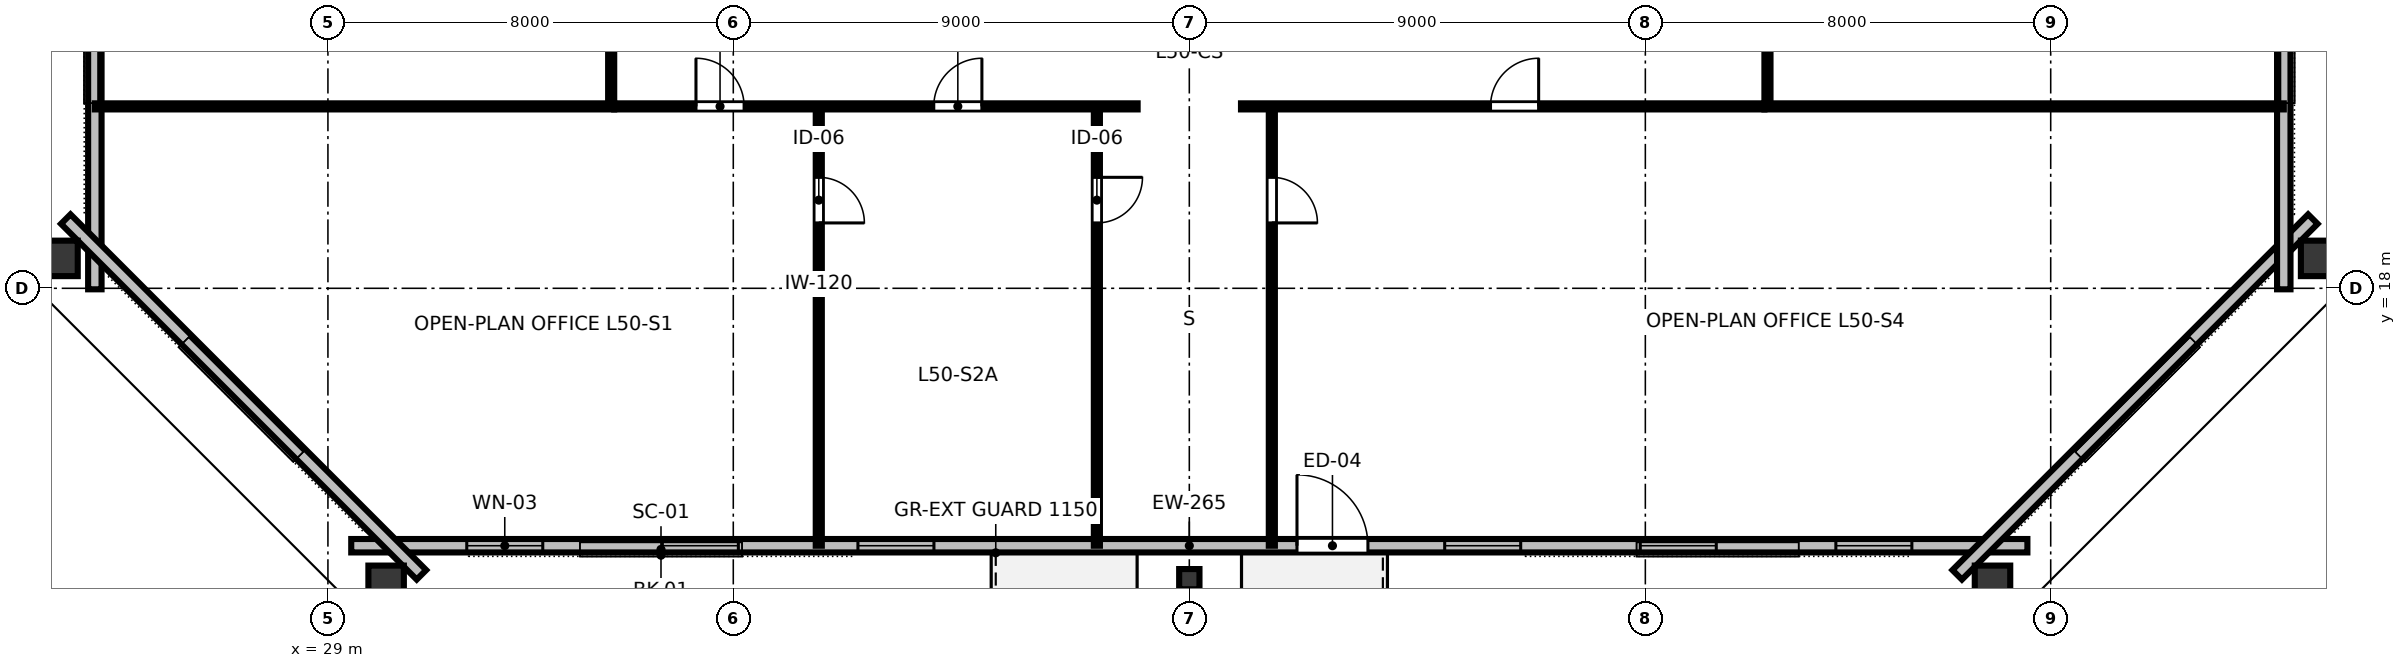
"""IFC4 building model, lengths in metres.
Left out: names, types, materials, properties, quantities, classifications, styles, units other than length and angle.
Written with IfcOpenShell. Run it as: python <this file> out.ifc"""

import sys

from ifc_helpers import new_model, si_unit, direction, frame, frame_2d, origin, origin_2d, place, context, subcontext, project, spatial, rectangle, hollow_rectangle, i_section, extrude, element, fill, save


model = new_model("IFC4")
c1 = context("Model", 3, precision=1e-05, world=origin(), true_north=direction((0.0, 1.0)))
c2 = subcontext(c1, "Body", "Model", "MODEL_VIEW")
j1 = project(units=[si_unit("LENGTHUNIT", "METRE"), si_unit("PLANEANGLEUNIT", "RADIAN")], contexts=[c1])
p1 = place(None, origin())
s1 = spatial("IfcSite", under=j1, at=p1, CompositionType="ELEMENT")
p2 = place(p1, origin())
s2 = spatial("IfcBuilding", under=s1, at=p2, CompositionType="ELEMENT")
p3 = place(p2, frame((0.0, 0.0, 191.4)))
s3 = spatial("IfcBuildingStorey", under=s2, at=p3, CompositionType="ELEMENT", Elevation=191.4)
p4 = place(p3, frame((30.149, 12.103, 0.0), z_axis=(0.0, 0.0, 1.0), x_axis=(1.0, 0.0, 0.0)))
e1 = element("IfcColumn", 1, at=p4, inside=s3, PredefinedType="COLUMN", context=c2, shape_type="SweptSolid", body=[
    extrude(hollow_rectangle(XDim=0.7, YDim=0.85, WallThickness=0.04, at=origin_2d()), origin(), (0.0, 0.0, 1.0), 3.373),
])
p5 = place(p3, frame((46.0, 12.26, 0.0), z_axis=(0.0, 0.0, 1.0), x_axis=(1.0, 0.0, 0.0)))
e2 = element("IfcColumn", 2, at=p5, inside=s3, PredefinedType="COLUMN", context=c2, shape_type="SweptSolid", body=[
    extrude(i_section(OverallWidth=0.401, OverallDepth=0.399, WebThickness=0.025, FlangeThickness=0.04, FilletRadius=0.025, at=origin_2d()), origin(), (0.0, 0.0, 1.0), 3.373),
])
for number, where, z_axis, x_axis in (
    (3, (61.851, 12.103, 0.0), (0.0, 0.0, 1.0), (1.0, 0.0, 0.0)),
    (4, (68.363, 18.59, 0.0), (0.0, 0.0, 1.0), (0.0, 1.0, 0.0)),
    (5, (23.637, 18.59, 0.0), (0.0, 0.0, 1.0), (0.0, 1.0, 0.0)),
):
    element("IfcColumn", number, at=place(p3, frame(where, z_axis=z_axis, x_axis=x_axis)), inside=s3, PredefinedType="COLUMN", context=c2, shape_type="SweptSolid", body=[
        extrude(hollow_rectangle(XDim=0.7, YDim=0.85, WallThickness=0.04, at=origin_2d()), origin(), (0.0, 0.0, 1.0), 3.373),
    ])
p6 = place(p3, frame((29.46, 12.92, 0.0), z_axis=(0.0, 0.0, 1.0), x_axis=(1.0, 0.0, 0.0)))
e6 = element("IfcWall", 6, at=p6, inside=s3, PredefinedType="STANDARD", context=c2, shape_type="SweptSolid", body=[
    extrude(rectangle(XDim=33.08, YDim=0.265, at=frame_2d((16.54, 0.0))), origin(), (0.0, 0.0, 1.0), 3.375),
])
p7 = place(p6, frame((18.665, 0.0, 0.0)))
e7 = element("IfcOpeningElement", 7, at=p7, cuts=e6, PredefinedType="OPENING", context=c2, shape_type="SweptSolid", body=[
    extrude(rectangle(XDim=1.4, YDim=2.15, at=frame_2d((0.7, 1.075))), frame((0.0, 0.142, 0.0), z_axis=(0.0, -1.0, 0.0), x_axis=(1.0, 0.0, 0.0)), (0.0, 0.0, 1.0), 0.285),
])
p8 = place(p6, frame((2.28, 0.0, 0.85)))
e8 = element("IfcOpeningElement", 8, at=p8, cuts=e6, PredefinedType="OPENING", context=c2, shape_type="SweptSolid", body=[
    extrude(rectangle(XDim=1.5, YDim=1.85, at=frame_2d((0.75, 0.925))), frame((0.0, 0.142, 0.0), z_axis=(0.0, -1.0, 0.0), x_axis=(1.0, 0.0, 0.0)), (0.0, 0.0, 1.0), 0.285),
])
p9 = place(p6, frame((6.14, 0.0, 0.85)))
e9 = element("IfcOpeningElement", 9, at=p9, cuts=e6, PredefinedType="OPENING", context=c2, shape_type="SweptSolid", body=[
    extrude(rectangle(XDim=1.5, YDim=1.85, at=frame_2d((0.75, 0.925))), frame((0.0, 0.142, 0.0), z_axis=(0.0, -1.0, 0.0), x_axis=(1.0, 0.0, 0.0)), (0.0, 0.0, 1.0), 0.285),
])
p10 = place(p6, frame((10.0, 0.0, 0.85)))
e10 = element("IfcOpeningElement", 10, at=p10, cuts=e6, PredefinedType="OPENING", context=c2, shape_type="SweptSolid", body=[
    extrude(rectangle(XDim=1.5, YDim=1.85, at=frame_2d((0.75, 0.925))), frame((0.0, 0.142, 0.0), z_axis=(0.0, -1.0, 0.0), x_axis=(1.0, 0.0, 0.0)), (0.0, 0.0, 1.0), 0.285),
])
p11 = place(p6, frame((21.58, 0.0, 0.85)))
e11 = element("IfcOpeningElement", 11, at=p11, cuts=e6, PredefinedType="OPENING", context=c2, shape_type="SweptSolid", body=[
    extrude(rectangle(XDim=1.5, YDim=1.85, at=frame_2d((0.75, 0.925))), frame((0.0, 0.142, 0.0), z_axis=(0.0, -1.0, 0.0), x_axis=(1.0, 0.0, 0.0)), (0.0, 0.0, 1.0), 0.285),
])
p12 = place(p6, frame((25.44, 0.0, 0.85)))
e12 = element("IfcOpeningElement", 12, at=p12, cuts=e6, PredefinedType="OPENING", context=c2, shape_type="SweptSolid", body=[
    extrude(rectangle(XDim=1.5, YDim=1.85, at=frame_2d((0.75, 0.925))), frame((0.0, 0.142, 0.0), z_axis=(0.0, -1.0, 0.0), x_axis=(1.0, 0.0, 0.0)), (0.0, 0.0, 1.0), 0.285),
])
p13 = place(p6, frame((29.3, 0.0, 0.85)))
e13 = element("IfcOpeningElement", 13, at=p13, cuts=e6, PredefinedType="OPENING", context=c2, shape_type="SweptSolid", body=[
    extrude(rectangle(XDim=1.5, YDim=1.85, at=frame_2d((0.75, 0.925))), frame((0.0, 0.142, 0.0), z_axis=(0.0, -1.0, 0.0), x_axis=(1.0, 0.0, 0.0)), (0.0, 0.0, 1.0), 0.285),
])
p14 = place(p3, frame((61.155, 12.346, 0.0), z_axis=(0.0, 0.0, 1.0), x_axis=(0.707106781187, 0.707106781187, 0.0)))
e14 = element("IfcWall", 14, at=p14, inside=s3, PredefinedType="STANDARD", context=c2, shape_type="SweptSolid", body=[
    extrude(rectangle(XDim=9.927, YDim=0.265, at=frame_2d((4.963, 0.0))), origin(), (0.0, 0.0, 1.0), 3.375),
])
p15 = place(p3, frame((67.6, 17.98, 0.0), z_axis=(0.0, 0.0, 1.0), x_axis=(0.0, 1.0, 0.0)))
e15 = element("IfcWall", 15, at=p15, inside=s3, PredefinedType="STANDARD", context=c2, shape_type="SweptSolid", body=[
    extrude(rectangle(XDim=28.04, YDim=0.265, at=frame_2d((14.02, 0.0))), origin(), (0.0, 0.0, 1.0), 3.375),
])
p16 = place(p15, frame((5.887, 0.0, 0.85)))
e16 = element("IfcOpeningElement", 16, at=p16, cuts=e15, PredefinedType="OPENING", context=c2, shape_type="SweptSolid", body=[
    extrude(rectangle(XDim=1.5, YDim=1.85, at=frame_2d((0.75, 0.925))), frame((0.0, 0.142, 0.0), z_axis=(0.0, -1.0, 0.0), x_axis=(1.0, 0.0, 0.0)), (0.0, 0.0, 1.0), 0.285),
])
p17 = place(p15, frame((9.579, 0.0, 0.85)))
e17 = element("IfcOpeningElement", 17, at=p17, cuts=e15, PredefinedType="OPENING", context=c2, shape_type="SweptSolid", body=[
    extrude(rectangle(XDim=1.5, YDim=1.85, at=frame_2d((0.75, 0.925))), frame((0.0, 0.142, 0.0), z_axis=(0.0, -1.0, 0.0), x_axis=(1.0, 0.0, 0.0)), (0.0, 0.0, 1.0), 0.285),
])
p18 = place(p15, frame((16.961, 0.0, 0.85)))
e18 = element("IfcOpeningElement", 18, at=p18, cuts=e15, PredefinedType="OPENING", context=c2, shape_type="SweptSolid", body=[
    extrude(rectangle(XDim=1.5, YDim=1.85, at=frame_2d((0.75, 0.925))), frame((0.0, 0.142, 0.0), z_axis=(0.0, -1.0, 0.0), x_axis=(1.0, 0.0, 0.0)), (0.0, 0.0, 1.0), 0.285),
])
p19 = place(p15, frame((20.653, 0.0, 0.85)))
e19 = element("IfcOpeningElement", 19, at=p19, cuts=e15, PredefinedType="OPENING", context=c2, shape_type="SweptSolid", body=[
    extrude(rectangle(XDim=1.5, YDim=1.85, at=frame_2d((0.75, 0.925))), frame((0.0, 0.142, 0.0), z_axis=(0.0, -1.0, 0.0), x_axis=(1.0, 0.0, 0.0)), (0.0, 0.0, 1.0), 0.285),
])
p20 = place(p3, frame((24.4, 46.02, 0.0), z_axis=(0.0, 0.0, 1.0), x_axis=(0.0, -1.0, 0.0)))
e20 = element("IfcWall", 20, at=p20, inside=s3, PredefinedType="STANDARD", context=c2, shape_type="SweptSolid", body=[
    extrude(rectangle(XDim=28.04, YDim=0.265, at=frame_2d((14.02, 0.0))), origin(), (0.0, 0.0, 1.0), 3.375),
])
p21 = place(p20, frame((5.887, 0.0, 0.85)))
e21 = element("IfcOpeningElement", 21, at=p21, cuts=e20, PredefinedType="OPENING", context=c2, shape_type="SweptSolid", body=[
    extrude(rectangle(XDim=1.5, YDim=1.85, at=frame_2d((0.75, 0.925))), frame((0.0, 0.142, 0.0), z_axis=(0.0, -1.0, 0.0), x_axis=(1.0, 0.0, 0.0)), (0.0, 0.0, 1.0), 0.285),
])
p22 = place(p20, frame((16.961, 0.0, 0.85)))
e22 = element("IfcOpeningElement", 22, at=p22, cuts=e20, PredefinedType="OPENING", context=c2, shape_type="SweptSolid", body=[
    extrude(rectangle(XDim=1.5, YDim=1.85, at=frame_2d((0.75, 0.925))), frame((0.0, 0.142, 0.0), z_axis=(0.0, -1.0, 0.0), x_axis=(1.0, 0.0, 0.0)), (0.0, 0.0, 1.0), 0.285),
])
p23 = place(p20, frame((20.653, 0.0, 0.85)))
e23 = element("IfcOpeningElement", 23, at=p23, cuts=e20, PredefinedType="OPENING", context=c2, shape_type="SweptSolid", body=[
    extrude(rectangle(XDim=1.5, YDim=1.85, at=frame_2d((0.75, 0.925))), frame((0.0, 0.142, 0.0), z_axis=(0.0, -1.0, 0.0), x_axis=(1.0, 0.0, 0.0)), (0.0, 0.0, 1.0), 0.285),
])
p24 = place(p3, frame((23.826, 19.365, 0.0), z_axis=(0.0, 0.0, 1.0), x_axis=(0.707106781187, -0.707106781187, 0.0)))
e24 = element("IfcWall", 24, at=p24, inside=s3, PredefinedType="STANDARD", context=c2, shape_type="SweptSolid", body=[
    extrude(rectangle(XDim=9.927, YDim=0.265, at=frame_2d((4.963, 0.0))), origin(), (0.0, 0.0, 1.0), 3.375),
])
p25 = place(p3, frame((38.687, 21.59, 0.0), z_axis=(0.0, 0.0, 1.0), x_axis=(0.0, -1.0, 0.0)))
e25 = element("IfcWall", 25, at=p25, inside=s3, PredefinedType="PARTITIONING", context=c2, shape_type="SweptSolid", body=[
    extrude(rectangle(XDim=8.67, YDim=0.12, at=frame_2d((4.335, 0.0))), origin(), (0.0, 0.0, 1.0), 2.655),
])
p26 = place(p25, frame((1.4, 0.0, 0.0)))
e26 = element("IfcOpeningElement", 26, at=p26, cuts=e25, PredefinedType="OPENING", context=c2, shape_type="SweptSolid", body=[
    extrude(rectangle(XDim=0.9, YDim=2.15, at=frame_2d((0.45, 1.075))), frame((0.0, 0.07, 0.0), z_axis=(0.0, -1.0, 0.0), x_axis=(1.0, 0.0, 0.0)), (0.0, 0.0, 1.0), 0.14),
])
p27 = place(p3, frame((44.176, 21.59, 0.0), z_axis=(0.0, 0.0, 1.0), x_axis=(0.0, -1.0, 0.0)))
e27 = element("IfcWall", 27, at=p27, inside=s3, PredefinedType="PARTITIONING", context=c2, shape_type="SweptSolid", body=[
    extrude(rectangle(XDim=8.67, YDim=0.12, at=frame_2d((4.335, 0.0))), origin(), (0.0, 0.0, 1.0), 2.655),
])
p28 = place(p27, frame((1.4, 0.0, 0.0)))
e28 = element("IfcOpeningElement", 28, at=p28, cuts=e27, PredefinedType="OPENING", context=c2, shape_type="SweptSolid", body=[
    extrude(rectangle(XDim=0.9, YDim=2.15, at=frame_2d((0.45, 1.075))), frame((0.0, 0.07, 0.0), z_axis=(0.0, -1.0, 0.0), x_axis=(1.0, 0.0, 0.0)), (0.0, 0.0, 1.0), 0.14),
])
p29 = place(p3, frame((47.629, 21.59, 0.0), z_axis=(0.0, 0.0, 1.0), x_axis=(0.0, -1.0, 0.0)))
e29 = element("IfcWall", 29, at=p29, inside=s3, PredefinedType="PARTITIONING", context=c2, shape_type="SweptSolid", body=[
    extrude(rectangle(XDim=8.67, YDim=0.12, at=frame_2d((4.335, 0.0))), origin(), (0.0, 0.0, 1.0), 2.655),
])
p30 = place(p29, frame((1.4, 0.0, 0.0)))
e30 = element("IfcOpeningElement", 30, at=p30, cuts=e29, PredefinedType="OPENING", context=c2, shape_type="SweptSolid", body=[
    extrude(rectangle(XDim=0.9, YDim=2.15, at=frame_2d((0.45, 1.075))), frame((0.0, 0.07, 0.0), z_axis=(0.0, -1.0, 0.0), x_axis=(1.0, 0.0, 0.0)), (0.0, 0.0, 1.0), 0.14),
])
p31 = place(p3, frame((34.65, 21.59, 0.0), z_axis=(0.0, 0.0, 1.0), x_axis=(1.0, 0.0, 0.0)))
e31 = element("IfcWall", 31, at=p31, inside=s3, PredefinedType="PARTITIONING", context=c2, shape_type="SweptSolid", body=[
    extrude(rectangle(XDim=10.33, YDim=0.12, at=frame_2d((5.165, 0.0))), origin(), (0.0, 0.0, 1.0), 2.655),
])
p32 = place(p31, frame((1.614, 0.0, 0.0)))
e32 = element("IfcOpeningElement", 32, at=p32, cuts=e31, PredefinedType="OPENING", context=c2, shape_type="SweptSolid", body=[
    extrude(rectangle(XDim=0.95, YDim=2.15, at=frame_2d((0.475, 1.075))), frame((0.0, 0.07, 0.0), z_axis=(0.0, -1.0, 0.0), x_axis=(1.0, 0.0, 0.0)), (0.0, 0.0, 1.0), 0.14),
])
p33 = place(p31, frame((6.306, 0.0, 0.0)))
e33 = element("IfcOpeningElement", 33, at=p33, cuts=e31, PredefinedType="OPENING", context=c2, shape_type="SweptSolid", body=[
    extrude(rectangle(XDim=0.95, YDim=2.15, at=frame_2d((0.475, 1.075))), frame((0.0, 0.07, 0.0), z_axis=(0.0, -1.0, 0.0), x_axis=(1.0, 0.0, 0.0)), (0.0, 0.0, 1.0), 0.14),
])
p34 = place(p3, frame((47.02, 21.59, 0.0), z_axis=(0.0, 0.0, 1.0), x_axis=(1.0, 0.0, 0.0)))
e34 = element("IfcWall", 34, at=p34, inside=s3, PredefinedType="PARTITIONING", context=c2, shape_type="SweptSolid", body=[
    extrude(rectangle(XDim=10.33, YDim=0.12, at=frame_2d((5.165, 0.0))), origin(), (0.0, 0.0, 1.0), 2.655),
])
p35 = place(p34, frame((4.924, 0.0, 0.0)))
e35 = element("IfcOpeningElement", 35, at=p35, cuts=e34, PredefinedType="OPENING", context=c2, shape_type="SweptSolid", body=[
    extrude(rectangle(XDim=0.95, YDim=2.15, at=frame_2d((0.475, 1.075))), frame((0.0, 0.07, 0.0), z_axis=(0.0, -1.0, 0.0), x_axis=(1.0, 0.0, 0.0)), (0.0, 0.0, 1.0), 0.14),
])
p36 = place(p3, frame((34.59, 21.65, 0.0), z_axis=(0.0, 0.0, 1.0), x_axis=(0.0, 1.0, 0.0)))
e36 = element("IfcWall", 36, at=p36, inside=s3, PredefinedType="PARTITIONING", context=c2, shape_type="SweptSolid", body=[
    extrude(rectangle(XDim=20.7, YDim=0.12, at=frame_2d((10.35, 0.0))), origin(), (0.0, 0.0, 1.0), 2.655),
])
p37 = place(p36, frame((6.214, 0.0, 0.0)))
e37 = element("IfcOpeningElement", 37, at=p37, cuts=e36, PredefinedType="OPENING", context=c2, shape_type="SweptSolid", body=[
    extrude(rectangle(XDim=0.95, YDim=2.15, at=frame_2d((0.475, 1.075))), frame((0.0, 0.07, 0.0), z_axis=(0.0, -1.0, 0.0), x_axis=(1.0, 0.0, 0.0)), (0.0, 0.0, 1.0), 0.14),
])
p38 = place(p36, frame((16.365, 0.0, 0.0)))
e38 = element("IfcOpeningElement", 38, at=p38, cuts=e36, PredefinedType="OPENING", context=c2, shape_type="SweptSolid", body=[
    extrude(rectangle(XDim=0.95, YDim=2.15, at=frame_2d((0.475, 1.075))), frame((0.0, 0.07, 0.0), z_axis=(0.0, -1.0, 0.0), x_axis=(1.0, 0.0, 0.0)), (0.0, 0.0, 1.0), 0.14),
])
p39 = place(p3, frame((57.41, 21.65, 0.0), z_axis=(0.0, 0.0, 1.0), x_axis=(0.0, 1.0, 0.0)))
e39 = element("IfcWall", 39, at=p39, inside=s3, PredefinedType="PARTITIONING", context=c2, shape_type="SweptSolid", body=[
    extrude(rectangle(XDim=20.7, YDim=0.12, at=frame_2d((10.35, 0.0))), origin(), (0.0, 0.0, 1.0), 2.655),
])
p40 = place(p39, frame((9.875, 0.0, 0.0)))
e40 = element("IfcOpeningElement", 40, at=p40, cuts=e39, PredefinedType="OPENING", context=c2, shape_type="SweptSolid", body=[
    extrude(rectangle(XDim=0.95, YDim=2.15, at=frame_2d((0.475, 1.075))), frame((0.0, 0.07, 0.0), z_axis=(0.0, -1.0, 0.0), x_axis=(1.0, 0.0, 0.0)), (0.0, 0.0, 1.0), 0.14),
])
for number, where, z_axis, x_axis in (
    (41, (34.65, 21.59, 0.0), (0.0, 0.0, 1.0), (-1.0, 0.0, 0.0)),
    (42, (57.35, 21.59, 0.0), (0.0, 0.0, 1.0), (1.0, 0.0, 0.0)),
):
    element("IfcWall", number, at=place(p3, frame(where, z_axis=z_axis, x_axis=x_axis)), inside=s3, PredefinedType="PARTITIONING", context=c2, shape_type="SweptSolid", body=[
        extrude(rectangle(XDim=10.25, YDim=0.12, at=frame_2d((5.125, 0.0))), origin(), (0.0, 0.0, 1.0), 2.655),
    ])
p41 = place(p7, origin())
e43 = element("IfcDoor", 43, at=p41, inside=s3, OperationType="SINGLE_SWING_LEFT", PredefinedType="DOOR", context=c2, shape_type="SweptSolid", body=[
    extrude(rectangle(XDim=1.4, YDim=2.15, at=frame_2d((0.7, 1.075))), frame((0.0, 0.025, 0.0), z_axis=(0.0, -1.0, 0.0), x_axis=(1.0, 0.0, 0.0)), (0.0, 0.0, 1.0), 0.05),
])
fill(e7, e43)
p42 = place(p8, origin())
e44 = element("IfcWindow", 44, at=p42, inside=s3, PartitioningType="SINGLE_PANEL", PredefinedType="WINDOW", context=c2, shape_type="SweptSolid", body=[
    extrude(rectangle(XDim=1.5, YDim=1.85, at=frame_2d((0.75, 0.925))), frame((0.0, 0.03, 0.0), z_axis=(0.0, -1.0, 0.0), x_axis=(1.0, 0.0, 0.0)), (0.0, 0.0, 1.0), 0.06),
])
fill(e8, e44)
p43 = place(p9, origin())
e45 = element("IfcWindow", 45, at=p43, inside=s3, PartitioningType="SINGLE_PANEL", PredefinedType="WINDOW", context=c2, shape_type="SweptSolid", body=[
    extrude(rectangle(XDim=1.5, YDim=1.85, at=frame_2d((0.75, 0.925))), frame((0.0, 0.03, 0.0), z_axis=(0.0, -1.0, 0.0), x_axis=(1.0, 0.0, 0.0)), (0.0, 0.0, 1.0), 0.06),
])
fill(e9, e45)
p44 = place(p10, origin())
e46 = element("IfcWindow", 46, at=p44, inside=s3, PartitioningType="SINGLE_PANEL", PredefinedType="WINDOW", context=c2, shape_type="SweptSolid", body=[
    extrude(rectangle(XDim=1.5, YDim=1.85, at=frame_2d((0.75, 0.925))), frame((0.0, 0.03, 0.0), z_axis=(0.0, -1.0, 0.0), x_axis=(1.0, 0.0, 0.0)), (0.0, 0.0, 1.0), 0.06),
])
fill(e10, e46)
p45 = place(p11, origin())
e47 = element("IfcWindow", 47, at=p45, inside=s3, PartitioningType="SINGLE_PANEL", PredefinedType="WINDOW", context=c2, shape_type="SweptSolid", body=[
    extrude(rectangle(XDim=1.5, YDim=1.85, at=frame_2d((0.75, 0.925))), frame((0.0, 0.03, 0.0), z_axis=(0.0, -1.0, 0.0), x_axis=(1.0, 0.0, 0.0)), (0.0, 0.0, 1.0), 0.06),
])
fill(e11, e47)
p46 = place(p12, origin())
e48 = element("IfcWindow", 48, at=p46, inside=s3, PartitioningType="SINGLE_PANEL", PredefinedType="WINDOW", context=c2, shape_type="SweptSolid", body=[
    extrude(rectangle(XDim=1.5, YDim=1.85, at=frame_2d((0.75, 0.925))), frame((0.0, 0.03, 0.0), z_axis=(0.0, -1.0, 0.0), x_axis=(1.0, 0.0, 0.0)), (0.0, 0.0, 1.0), 0.06),
])
fill(e12, e48)
p47 = place(p13, origin())
e49 = element("IfcWindow", 49, at=p47, inside=s3, PartitioningType="SINGLE_PANEL", PredefinedType="WINDOW", context=c2, shape_type="SweptSolid", body=[
    extrude(rectangle(XDim=1.5, YDim=1.85, at=frame_2d((0.75, 0.925))), frame((0.0, 0.03, 0.0), z_axis=(0.0, -1.0, 0.0), x_axis=(1.0, 0.0, 0.0)), (0.0, 0.0, 1.0), 0.06),
])
fill(e13, e49)
p48 = place(p26, origin())
e50 = element("IfcDoor", 50, at=p48, inside=s3, OperationType="SINGLE_SWING_RIGHT", PredefinedType="DOOR", context=c2, shape_type="SweptSolid", body=[
    extrude(rectangle(XDim=0.9, YDim=2.15, at=frame_2d((0.45, 1.075))), frame((0.0, 0.025, 0.0), z_axis=(0.0, -1.0, 0.0), x_axis=(1.0, 0.0, 0.0)), (0.0, 0.0, 1.0), 0.05),
])
fill(e26, e50)
p49 = place(p28, origin())
e51 = element("IfcDoor", 51, at=p49, inside=s3, OperationType="SINGLE_SWING_LEFT", PredefinedType="DOOR", context=c2, shape_type="SweptSolid", body=[
    extrude(rectangle(XDim=0.9, YDim=2.15, at=frame_2d((0.45, 1.075))), frame((0.0, 0.025, 0.0), z_axis=(0.0, -1.0, 0.0), x_axis=(1.0, 0.0, 0.0)), (0.0, 0.0, 1.0), 0.05),
])
fill(e28, e51)
p50 = place(p30, origin())
e52 = element("IfcDoor", 52, at=p50, inside=s3, OperationType="SINGLE_SWING_RIGHT", PredefinedType="DOOR", context=c2, shape_type="SweptSolid", body=[
    extrude(rectangle(XDim=0.9, YDim=2.15, at=frame_2d((0.45, 1.075))), frame((0.0, 0.025, 0.0), z_axis=(0.0, -1.0, 0.0), x_axis=(1.0, 0.0, 0.0)), (0.0, 0.0, 1.0), 0.05),
])
fill(e30, e52)
p51 = place(p32, origin())
e53 = element("IfcDoor", 53, at=p51, inside=s3, OperationType="SINGLE_SWING_LEFT", PredefinedType="DOOR", context=c2, shape_type="SweptSolid", body=[
    extrude(rectangle(XDim=0.95, YDim=2.15, at=frame_2d((0.475, 1.075))), frame((0.0, 0.025, 0.0), z_axis=(0.0, -1.0, 0.0), x_axis=(1.0, 0.0, 0.0)), (0.0, 0.0, 1.0), 0.05),
])
fill(e32, e53)
p52 = place(p33, origin())
e54 = element("IfcDoor", 54, at=p52, inside=s3, OperationType="SINGLE_SWING_RIGHT", PredefinedType="DOOR", context=c2, shape_type="SweptSolid", body=[
    extrude(rectangle(XDim=0.95, YDim=2.15, at=frame_2d((0.475, 1.075))), frame((0.0, 0.025, 0.0), z_axis=(0.0, -1.0, 0.0), x_axis=(1.0, 0.0, 0.0)), (0.0, 0.0, 1.0), 0.05),
])
fill(e33, e54)
p53 = place(p35, origin())
e55 = element("IfcDoor", 55, at=p53, inside=s3, OperationType="SINGLE_SWING_RIGHT", PredefinedType="DOOR", context=c2, shape_type="SweptSolid", body=[
    extrude(rectangle(XDim=0.95, YDim=2.15, at=frame_2d((0.475, 1.075))), frame((0.0, 0.025, 0.0), z_axis=(0.0, -1.0, 0.0), x_axis=(1.0, 0.0, 0.0)), (0.0, 0.0, 1.0), 0.05),
])
fill(e35, e55)
save(model, sys.argv[1])
